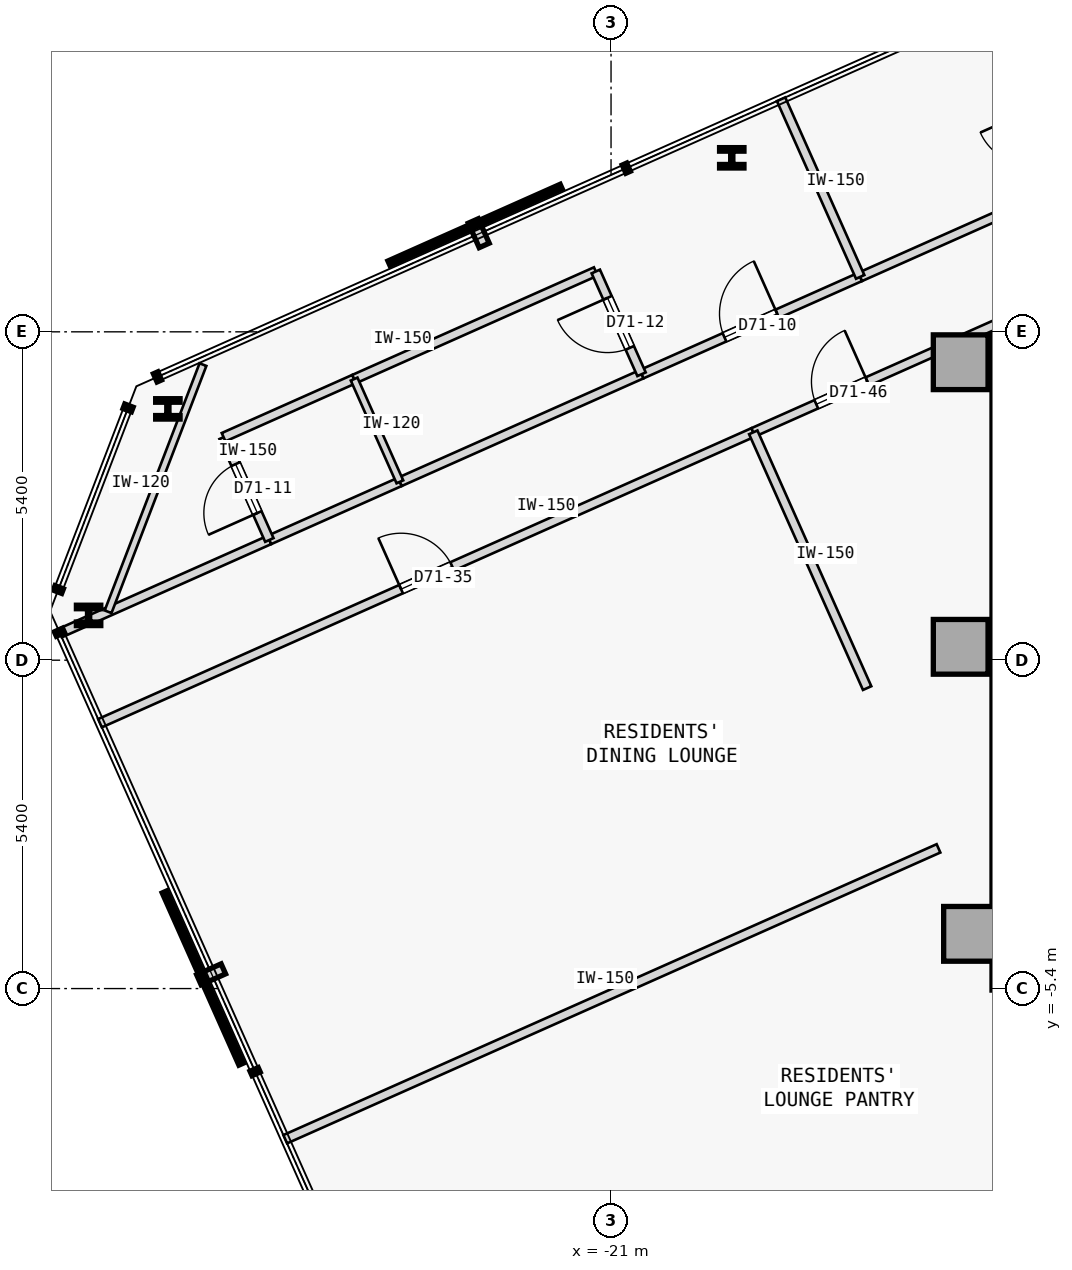
"""IFC4 building model, lengths in metres.
Left out: names, types, materials, properties, quantities, classifications, styles, units other than length and angle.
Written with IfcOpenShell. Run it as: python <this file> out.ifc"""

import sys

from ifc_helpers import new_model, si_unit, direction, frame, frame_2d, origin, origin_2d, place, context, subcontext, project, spatial, rectangle, i_section, extrude, element, fill, save


model = new_model("IFC4")
c1 = context("Model", 3, precision=1e-05, world=origin(), true_north=direction((0.0, 1.0)))
c2 = subcontext(c1, "Body", "Model", "MODEL_VIEW")
j1 = project(units=[si_unit("LENGTHUNIT", "METRE"), si_unit("PLANEANGLEUNIT", "RADIAN")], contexts=[c1])
p1 = place(None, origin())
s1 = spatial("IfcSite", under=j1, at=p1, CompositionType="ELEMENT")
p2 = place(p1, origin())
s2 = spatial("IfcBuilding", under=s1, at=p2, CompositionType="ELEMENT")
p3 = place(p2, frame((0.0, 0.0, 265.55)))
s3 = spatial("IfcBuildingStorey", under=s2, at=p3, CompositionType="ELEMENT", Elevation=265.55)
for number, where, z_axis, x_axis in (
    (1, (-15.25, 4.9, 0.0), (0.0, 0.0, 1.0), (1.0, 0.0, 0.0)),
    (2, (-15.25, 0.22, 0.0), (0.0, 0.0, 1.0), (1.0, 0.0, 0.0)),
    (3, (-15.08, -4.5, 0.0), (0.0, 0.0, 1.0), (1.0, 0.0, 0.0)),
):
    element("IfcColumn", number, at=place(p3, frame(where, z_axis=z_axis, x_axis=x_axis)), inside=s3, PredefinedType="COLUMN", context=c2, shape_type="SweptSolid", body=[
        extrude(rectangle(XDim=0.9, YDim=0.9, at=origin_2d()), origin(), (0.0, 0.0, 1.0), 3.35),
    ])
p4 = place(p3, frame((-14.56, -5.425, 0.0), z_axis=(0.0, 0.0, 1.0), x_axis=(0.0, 1.0, 0.0)))
e4 = element("IfcWall", 4, at=p4, inside=s3, PredefinedType="SHEAR", context=c2, shape_type="SweptSolid", body=[
    extrude(rectangle(XDim=10.85, YDim=0.35, at=frame_2d((5.425, 0.0))), origin(), (0.0, 0.0, 1.0), 3.125),
])
for number, where, z_axis, x_axis in (
    (5, (-19.015, 8.262, 0.0), (0.0, 0.0, 1.0), (1.0, 0.0, 0.0)),
    (6, (-28.288, 4.133, 0.0), (0.0, 0.0, 1.0), (1.0, 0.0, 0.0)),
    (7, (-29.592, 0.737, 0.0), (0.0, 0.0, 1.0), (1.0, 0.0, 0.0)),
):
    element("IfcColumn", number, at=place(p3, frame(where, z_axis=z_axis, x_axis=x_axis)), inside=s3, PredefinedType="COLUMN", context=c2, shape_type="SweptSolid", body=[
        extrude(i_section(OverallWidth=0.401, OverallDepth=0.335, WebThickness=0.036, FlangeThickness=0.058, FilletRadius=0.015, at=origin_2d()), origin(), (0.0, 0.0, 1.0), 3.35),
    ])
p5 = place(p3, frame((-30.063, 0.444, 0.0), z_axis=(0.0, 0.0, 1.0), x_axis=(0.913541633228, 0.406745232743, 0.0)))
e8 = element("IfcWall", 8, at=p5, inside=s3, PredefinedType="PARTITIONING", context=c2, shape_type="SweptSolid", body=[
    extrude(rectangle(XDim=3.77, YDim=0.15, at=frame_2d((1.885, 0.0))), origin(), (0.0, 0.0, 1.0), 3.125),
])
p6 = place(p3, frame((-20.499, 4.702, 0.0), z_axis=(0.0, 0.0, 1.0), x_axis=(0.913553019012, 0.406719659537, 0.0)))
e9 = element("IfcWall", 9, at=p6, inside=s3, PredefinedType="PARTITIONING", context=c2, shape_type="SweptSolid", body=[
    extrude(rectangle(XDim=3.936, YDim=0.15, at=frame_2d((1.968, 0.0))), origin(), (0.0, 0.0, 1.0), 3.125),
])
p7 = place(p6, frame((1.493, 0.0, 0.0)))
e10 = element("IfcOpeningElement", 10, at=p7, cuts=e9, PredefinedType="OPENING", context=c2, shape_type="SweptSolid", body=[
    extrude(rectangle(XDim=0.95, YDim=2.15, at=frame_2d((0.475, 1.075))), frame((0.0, 0.085, 0.0), z_axis=(0.0, -1.0, 0.0), x_axis=(1.0, 0.0, 0.0)), (0.0, 0.0, 1.0), 0.17),
])
p8 = place(p3, frame((-26.619, 1.977, 0.0), z_axis=(0.0, 0.0, 1.0), x_axis=(0.913541436194, 0.406745675276, 0.0)))
e11 = element("IfcWall", 11, at=p8, inside=s3, PredefinedType="PARTITIONING", context=c2, shape_type="SweptSolid", body=[
    extrude(rectangle(XDim=2.35, YDim=0.15, at=frame_2d((1.175, 0.0))), origin(), (0.0, 0.0, 1.0), 3.125),
])
p9 = place(p3, frame((-24.472, 2.933, 0.0), z_axis=(0.0, 0.0, 1.0), x_axis=(0.913545193015, 0.406737237438, 0.0)))
e12 = element("IfcWall", 12, at=p9, inside=s3, PredefinedType="PARTITIONING", context=c2, shape_type="SweptSolid", body=[
    extrude(rectangle(XDim=4.35, YDim=0.15, at=frame_2d((2.175, 0.0))), origin(), (0.0, 0.0, 1.0), 3.125),
])
p10 = place(p3, frame((-16.903, 6.303, 0.0), z_axis=(0.0, 0.0, 1.0), x_axis=(0.913543802, 0.40674036169, 0.0)))
e13 = element("IfcWall", 13, at=p10, inside=s3, PredefinedType="PARTITIONING", context=c2, shape_type="SweptSolid", body=[
    extrude(rectangle(XDim=3.65, YDim=0.15, at=frame_2d((1.825, 0.0))), origin(), (0.0, 0.0, 1.0), 3.125),
])
p11 = place(p3, frame((-29.404, -1.036, 0.0), z_axis=(0.0, 0.0, 1.0), x_axis=(0.913544247064, 0.406739362069, 0.0)))
e14 = element("IfcWall", 14, at=p11, inside=s3, PredefinedType="PARTITIONING", context=c2, shape_type="SweptSolid", body=[
    extrude(rectangle(XDim=11.76, YDim=0.15, at=frame_2d((5.88, 0.0))), origin(), (0.0, 0.0, 1.0), 3.125),
])
p12 = place(p11, frame((5.42, 0.0, 0.0)))
e15 = element("IfcOpeningElement", 15, at=p12, cuts=e14, PredefinedType="OPENING", context=c2, shape_type="SweptSolid", body=[
    extrude(rectangle(XDim=0.92, YDim=2.15, at=frame_2d((0.46, 1.075))), frame((0.0, 0.085, 0.0), z_axis=(0.0, -1.0, 0.0), x_axis=(1.0, 0.0, 0.0)), (0.0, 0.0, 1.0), 0.17),
])
p13 = place(p3, frame((-18.661, 3.747, 0.0), z_axis=(0.0, 0.0, 1.0), x_axis=(0.913535055583, 0.40676000568, 0.0)))
e16 = element("IfcWall", 16, at=p13, inside=s3, PredefinedType="PARTITIONING", context=c2, shape_type="SweptSolid", body=[
    extrude(rectangle(XDim=4.555, YDim=0.15, at=frame_2d((2.277, 0.0))), origin(), (0.0, 0.0, 1.0), 3.125),
])
p14 = place(p13, frame((1.134, 0.0, 0.0)))
e17 = element("IfcOpeningElement", 17, at=p14, cuts=e16, PredefinedType="OPENING", context=c2, shape_type="SweptSolid", body=[
    extrude(rectangle(XDim=0.92, YDim=2.15, at=frame_2d((0.46, 1.075))), frame((0.0, 0.085, 0.0), z_axis=(0.0, -1.0, 0.0), x_axis=(1.0, 0.0, 0.0)), (0.0, 0.0, 1.0), 0.17),
])
p15 = place(p3, frame((-26.619, 1.977, 0.0), z_axis=(0.0, 0.0, 1.0), x_axis=(-0.406750635596, 0.913539227643, 0.0)))
e18 = element("IfcWall", 18, at=p15, inside=s3, PredefinedType="PARTITIONING", context=c2, shape_type="SweptSolid", body=[
    extrude(rectangle(XDim=1.85, YDim=0.15, at=frame_2d((0.925, 0.0))), origin(), (0.0, 0.0, 1.0), 3.125),
])
p16 = place(p15, frame((0.485, 0.0, 0.0)))
e19 = element("IfcOpeningElement", 19, at=p16, cuts=e18, PredefinedType="OPENING", context=c2, shape_type="SweptSolid", body=[
    extrude(rectangle(XDim=0.88, YDim=2.15, at=frame_2d((0.44, 1.075))), frame((0.0, 0.085, 0.0), z_axis=(0.0, -1.0, 0.0), x_axis=(1.0, 0.0, 0.0)), (0.0, 0.0, 1.0), 0.17),
])
p17 = place(p3, frame((-27.372, 3.667, 0.0), z_axis=(0.0, 0.0, 1.0), x_axis=(0.913541436194, 0.406745675276, 0.0)))
e20 = element("IfcWall", 20, at=p17, inside=s3, PredefinedType="PARTITIONING", context=c2, shape_type="SweptSolid", body=[
    extrude(rectangle(XDim=2.35, YDim=0.15, at=frame_2d((1.175, 0.0))), origin(), (0.0, 0.0, 1.0), 3.125),
])
p18 = place(p3, frame((-25.225, 4.623, 0.0), z_axis=(0.0, 0.0, 1.0), x_axis=(0.913545193015, 0.406737237438, 0.0)))
e21 = element("IfcWall", 21, at=p18, inside=s3, PredefinedType="PARTITIONING", context=c2, shape_type="SweptSolid", body=[
    extrude(rectangle(XDim=4.35, YDim=0.15, at=frame_2d((2.175, 0.0))), origin(), (0.0, 0.0, 1.0), 3.125),
])
p19 = place(p3, frame((-20.499, 4.702, 0.0), z_axis=(0.0, 0.0, 1.0), x_axis=(-0.406750635596, 0.913539227643, 0.0)))
e22 = element("IfcWall", 22, at=p19, inside=s3, PredefinedType="PARTITIONING", context=c2, shape_type="SweptSolid", body=[
    extrude(rectangle(XDim=1.85, YDim=0.15, at=frame_2d((0.925, 0.0))), origin(), (0.0, 0.0, 1.0), 3.125),
])
p20 = place(p19, frame((0.475, 0.0, 0.0)))
e23 = element("IfcOpeningElement", 23, at=p20, cuts=e22, PredefinedType="OPENING", context=c2, shape_type="SweptSolid", body=[
    extrude(rectangle(XDim=0.9, YDim=2.15, at=frame_2d((0.45, 1.075))), frame((0.0, 0.085, 0.0), z_axis=(0.0, -1.0, 0.0), x_axis=(1.0, 0.0, 0.0)), (0.0, 0.0, 1.0), 0.17),
])
p21 = place(p3, frame((-16.903, 6.303, 0.0), z_axis=(0.0, 0.0, 1.0), x_axis=(-0.406733350739, 0.913546923478, 0.0)))
e24 = element("IfcWall", 24, at=p21, inside=s3, PredefinedType="PARTITIONING", context=c2, shape_type="SweptSolid", body=[
    extrude(rectangle(XDim=3.198, YDim=0.15, at=frame_2d((1.599, 0.0))), origin(), (0.0, 0.0, 1.0), 3.125),
])
p22 = place(p3, frame((-24.472, 2.933, 0.0), z_axis=(0.0, 0.0, 1.0), x_axis=(-0.406750635596, 0.913539227643, 0.0)))
e25 = element("IfcWall", 25, at=p22, inside=s3, PredefinedType="PARTITIONING", context=c2, shape_type="SweptSolid", body=[
    extrude(rectangle(XDim=1.85, YDim=0.12, at=frame_2d((0.925, 0.0))), origin(), (0.0, 0.0, 1.0), 3.125),
])
p23 = place(p3, frame((-26.358, -7.878, 0.0), z_axis=(0.0, 0.0, 1.0), x_axis=(0.913547681516, 0.406731648137, 0.0)))
e26 = element("IfcWall", 26, at=p23, inside=s3, PredefinedType="PARTITIONING", context=c2, shape_type="SweptSolid", body=[
    extrude(rectangle(XDim=11.76, YDim=0.15, at=frame_2d((5.88, 0.0))), origin(), (0.0, 0.0, 1.0), 3.125),
])
p24 = place(p3, frame((-16.789, -0.459, 0.0), z_axis=(0.0, 0.0, 1.0), x_axis=(-0.406738654026, 0.913544562307, 0.0)))
e27 = element("IfcWall", 27, at=p24, inside=s3, PredefinedType="PARTITIONING", context=c2, shape_type="SweptSolid", body=[
    extrude(rectangle(XDim=4.604, YDim=0.15, at=frame_2d((2.302, 0.0))), origin(), (0.0, 0.0, 1.0), 3.125),
])
p25 = place(p3, frame((-27.711, 4.861, 0.0), z_axis=(0.0, 0.0, 1.0), x_axis=(-0.358310046253, -0.933602651428, 0.0)))
e28 = element("IfcWall", 28, at=p25, inside=s3, PredefinedType="PARTITIONING", context=c2, shape_type="SweptSolid", body=[
    extrude(rectangle(XDim=4.353, YDim=0.12, at=frame_2d((2.177, 0.0))), origin(), (0.0, 0.0, 1.0), 3.125),
])
p26 = place(p7, origin())
e29 = element("IfcDoor", 29, at=p26, inside=s3, OperationType="SINGLE_SWING_RIGHT", PredefinedType="DOOR", context=c2, shape_type="SweptSolid", body=[
    extrude(rectangle(XDim=0.95, YDim=2.15, at=frame_2d((0.475, 1.075))), frame((0.0, 0.025, 0.0), z_axis=(0.0, -1.0, 0.0), x_axis=(1.0, 0.0, 0.0)), (0.0, 0.0, 1.0), 0.05),
])
fill(e10, e29)
p27 = place(p16, origin())
e30 = element("IfcDoor", 30, at=p27, inside=s3, OperationType="SINGLE_SWING_LEFT", PredefinedType="DOOR", context=c2, shape_type="SweptSolid", body=[
    extrude(rectangle(XDim=0.88, YDim=2.15, at=frame_2d((0.44, 1.075))), frame((0.0, 0.025, 0.0), z_axis=(0.0, -1.0, 0.0), x_axis=(1.0, 0.0, 0.0)), (0.0, 0.0, 1.0), 0.05),
])
fill(e19, e30)
p28 = place(p20, origin())
e31 = element("IfcDoor", 31, at=p28, inside=s3, OperationType="SINGLE_SWING_RIGHT", PredefinedType="DOOR", context=c2, shape_type="SweptSolid", body=[
    extrude(rectangle(XDim=0.9, YDim=2.15, at=frame_2d((0.45, 1.075))), frame((0.0, 0.025, 0.0), z_axis=(0.0, -1.0, 0.0), x_axis=(1.0, 0.0, 0.0)), (0.0, 0.0, 1.0), 0.05),
])
fill(e23, e31)
p29 = place(p12, origin())
e32 = element("IfcDoor", 32, at=p29, inside=s3, OperationType="SINGLE_SWING_LEFT", PredefinedType="DOOR", context=c2, shape_type="SweptSolid", body=[
    extrude(rectangle(XDim=0.92, YDim=2.15, at=frame_2d((0.46, 1.075))), frame((0.0, 0.025, 0.0), z_axis=(0.0, -1.0, 0.0), x_axis=(1.0, 0.0, 0.0)), (0.0, 0.0, 1.0), 0.05),
])
fill(e15, e32)
p30 = place(p14, origin())
e33 = element("IfcDoor", 33, at=p30, inside=s3, OperationType="SINGLE_SWING_RIGHT", PredefinedType="DOOR", context=c2, shape_type="SweptSolid", body=[
    extrude(rectangle(XDim=0.92, YDim=2.15, at=frame_2d((0.46, 1.075))), frame((0.0, 0.025, 0.0), z_axis=(0.0, -1.0, 0.0), x_axis=(1.0, 0.0, 0.0)), (0.0, 0.0, 1.0), 0.05),
])
fill(e17, e33)
save(model, sys.argv[1])
